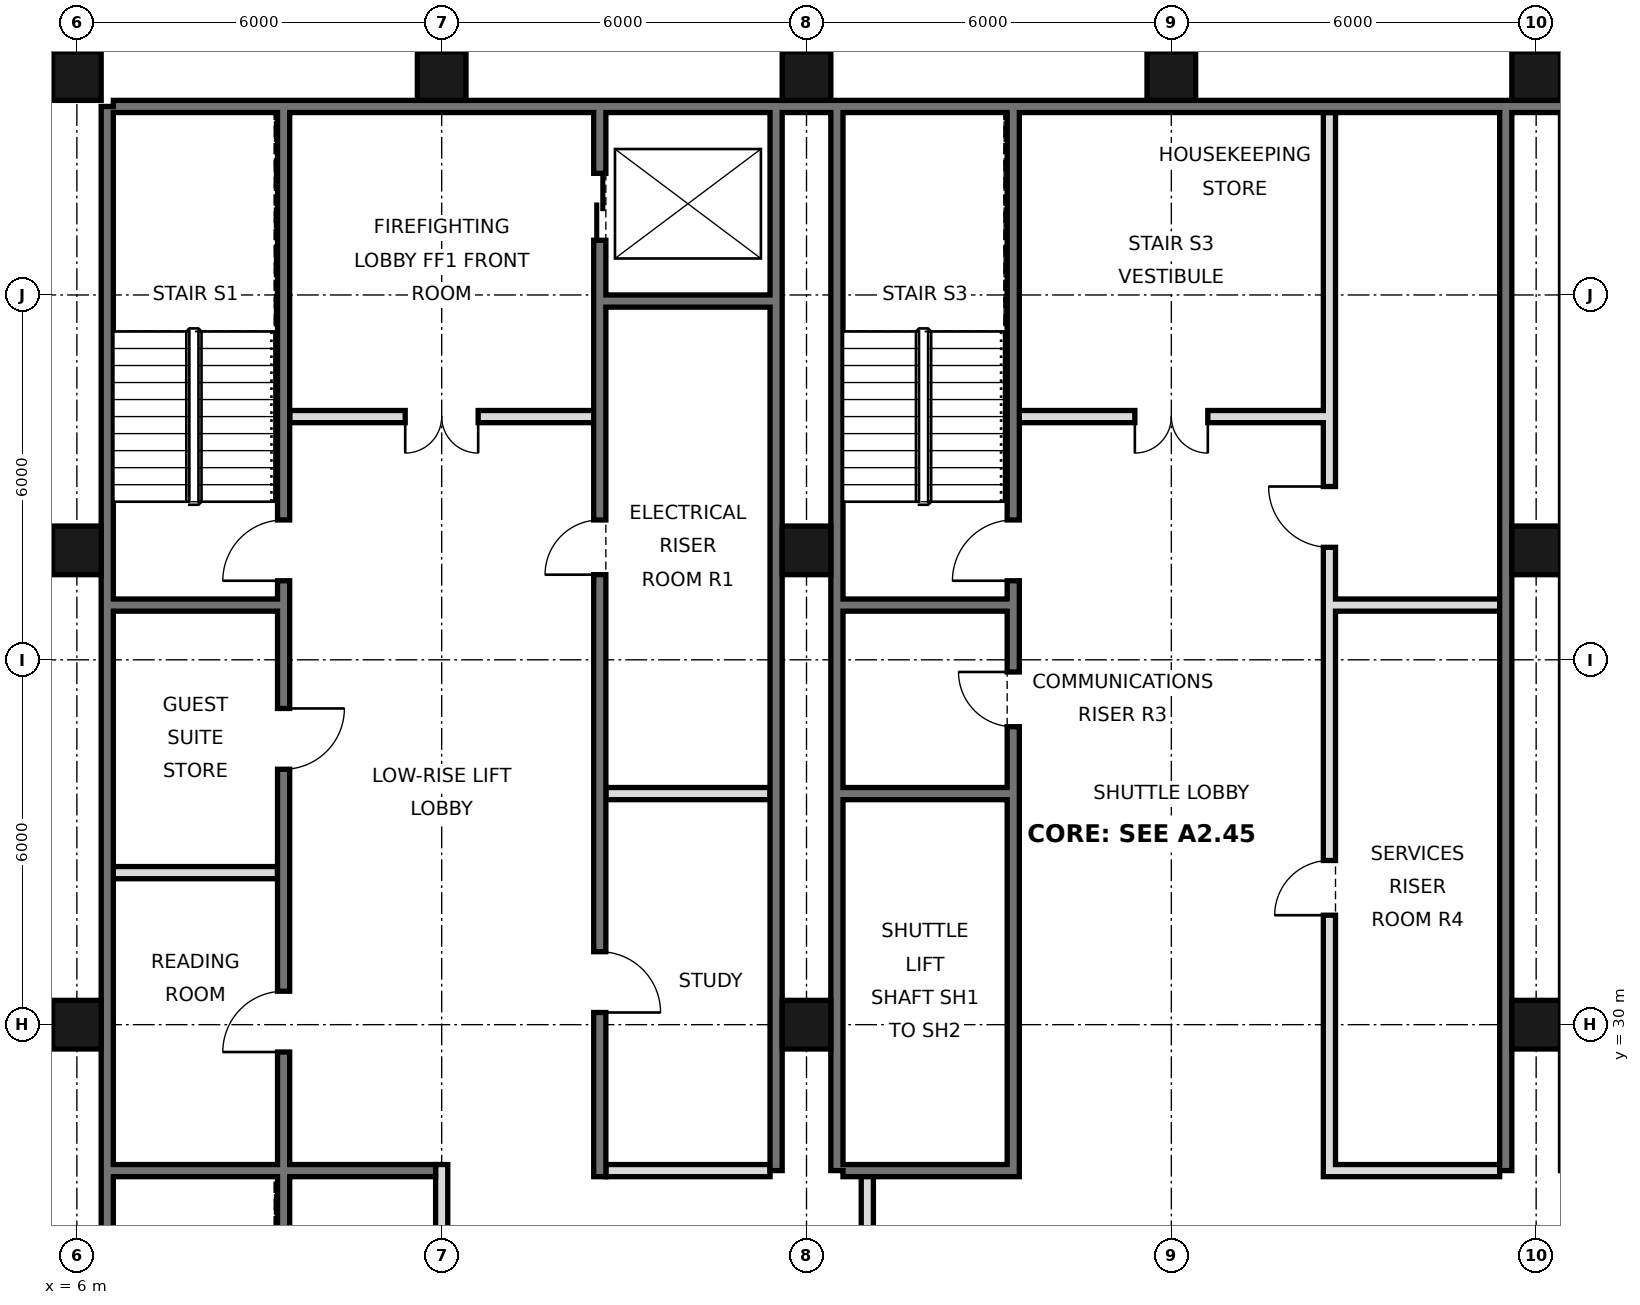
"""IFC4 building model, lengths in metres.
Left out: names, types, materials, properties, quantities, classifications, styles, units other than length and angle.
Written with IfcOpenShell. Run it as: python <this file> out.ifc"""

import sys

from ifc_helpers import new_model, si_unit, direction, frame, frame_2d, origin, origin_2d, place, context, subcontext, project, spatial, rectangle, hollow_rectangle, extrude, element, fill, save


model = new_model("IFC4")
c1 = context("Model", 3, precision=1e-05, world=origin(), true_north=direction((0.0, 1.0)))
c2 = subcontext(c1, "Body", "Model", "MODEL_VIEW")
j1 = project(units=[si_unit("LENGTHUNIT", "METRE"), si_unit("PLANEANGLEUNIT", "RADIAN")], contexts=[c1])
p1 = place(None, origin())
s1 = spatial("IfcSite", under=j1, at=p1, CompositionType="ELEMENT")
p2 = place(p1, origin())
s2 = spatial("IfcBuilding", under=s1, at=p2, CompositionType="ELEMENT")
p3 = place(p2, frame((0.0, 0.0, 178.0)))
s3 = spatial("IfcBuildingStorey", under=s2, at=p3, CompositionType="ELEMENT", Elevation=178.0)
for number, where, z_axis, x_axis in (
    (1, (6.0, 30.0, 0.0), (0.0, 0.0, 1.0), (1.0, 0.0, 0.0)),
    (2, (6.0, 37.8, 0.0), (0.0, 0.0, 1.0), (1.0, 0.0, 0.0)),
    (3, (6.0, 45.6, 0.0), (0.0, 0.0, 1.0), (1.0, 0.0, 0.0)),
    (4, (12.0, 45.6, 0.0), (0.0, 0.0, 1.0), (1.0, 0.0, 0.0)),
    (5, (18.0, 30.0, 0.0), (0.0, 0.0, 1.0), (1.0, 0.0, 0.0)),
    (6, (18.0, 37.8, 0.0), (0.0, 0.0, 1.0), (1.0, 0.0, 0.0)),
    (7, (18.0, 45.6, 0.0), (0.0, 0.0, 1.0), (1.0, 0.0, 0.0)),
    (8, (24.0, 45.6, 0.0), (0.0, 0.0, 1.0), (1.0, 0.0, 0.0)),
    (9, (30.0, 30.0, 0.0), (0.0, 0.0, 1.0), (1.0, 0.0, 0.0)),
    (10, (30.0, 37.8, 0.0), (0.0, 0.0, 1.0), (1.0, 0.0, 0.0)),
    (11, (30.0, 45.6, 0.0), (0.0, 0.0, 1.0), (1.0, 0.0, 0.0)),
):
    element("IfcColumn", number, at=place(p3, frame(where, z_axis=z_axis, x_axis=x_axis)), inside=s3, PredefinedType="COLUMN", context=c2, shape_type="SweptSolid", body=[
        extrude(hollow_rectangle(XDim=0.8, YDim=0.8, WallThickness=0.045, at=origin_2d()), origin(), (0.0, 0.0, 1.0), 3.6),
    ])
p4 = place(p3, frame((6.5, 21.6, 0.0), z_axis=(0.0, 0.0, 1.0), x_axis=(0.0, 1.0, 0.0)))
e12 = element("IfcWall", 12, at=p4, inside=s3, PredefinedType="SOLIDWALL", context=c2, shape_type="SweptSolid", body=[
    extrude(rectangle(XDim=23.5, YDim=0.2, at=frame_2d((11.75, 0.0))), origin(), (0.0, 0.0, 1.0), 3.42),
])
p5 = place(p3, frame((6.6, 45.1, 0.0), z_axis=(0.0, 0.0, 1.0), x_axis=(1.0, 0.0, 0.0)))
e13 = element("IfcWall", 13, at=p5, inside=s3, PredefinedType="SOLIDWALL", context=c2, shape_type="SweptSolid", body=[
    extrude(rectangle(XDim=34.8, YDim=0.2, at=frame_2d((17.4, 0.0))), origin(), (0.0, 0.0, 1.0), 3.42),
])
for number, where, z_axis, x_axis in (
    (14, (17.5, 27.6, 0.0), (0.0, 0.0, 1.0), (0.0, 1.0, 0.0)),
    (15, (18.5, 27.6, 0.0), (0.0, 0.0, 1.0), (0.0, 1.0, 0.0)),
    (16, (29.5, 27.6, 0.0), (0.0, 0.0, 1.0), (0.0, 1.0, 0.0)),
):
    element("IfcWall", number, at=place(p3, frame(where, z_axis=z_axis, x_axis=x_axis)), inside=s3, PredefinedType="SOLIDWALL", context=c2, shape_type="SweptSolid", body=[
        extrude(rectangle(XDim=17.5, YDim=0.2, at=frame_2d((8.75, 0.0))), origin(), (0.0, 0.0, 1.0), 3.42),
    ])
p6 = place(p3, frame((19.0, 21.6, 0.0), z_axis=(0.0, 0.0, 1.0), x_axis=(0.0, 1.0, 0.0)))
e17 = element("IfcWall", 17, at=p6, inside=s3, PredefinedType="PARTITIONING", context=c2, shape_type="SweptSolid", body=[
    extrude(rectangle(XDim=6.0, YDim=0.2, at=frame_2d((3.0, 0.0))), origin(), (0.0, 0.0, 1.0), 3.42),
])
p7 = place(p6, frame((2.1, 0.0, 0.0)))
e18 = element("IfcOpeningElement", 18, at=p7, cuts=e17, PredefinedType="OPENING", context=c2, shape_type="SweptSolid", body=[
    extrude(rectangle(XDim=1.8, YDim=2.1, at=frame_2d((0.9, 1.05))), frame((0.0, 0.11, 0.0), z_axis=(0.0, -1.0, 0.0), x_axis=(1.0, 0.0, 0.0)), (0.0, 0.0, 1.0), 0.22),
])
p8 = place(p3, frame((12.0, 21.6, 0.0), z_axis=(0.0, 0.0, 1.0), x_axis=(0.0, 1.0, 0.0)))
e19 = element("IfcWall", 19, at=p8, inside=s3, PredefinedType="PARTITIONING", context=c2, shape_type="SweptSolid", body=[
    extrude(rectangle(XDim=6.1, YDim=0.2, at=frame_2d((3.05, 0.0))), origin(), (0.0, 0.0, 1.0), 3.42),
])
p9 = place(p3, frame((14.6, 27.5, 0.0), z_axis=(0.0, 0.0, 1.0), x_axis=(0.0, 1.0, 0.0)))
e20 = element("IfcWall", 20, at=p9, inside=s3, PredefinedType="SOLIDWALL", context=c2, shape_type="SweptSolid", body=[
    extrude(rectangle(XDim=17.5, YDim=0.2, at=frame_2d((8.75, 0.0))), origin(), (0.0, 0.0, 1.0), 3.42),
])
p10 = place(p9, frame((15.4, 0.0, 0.0)))
e21 = element("IfcOpeningElement", 21, at=p10, cuts=e20, PredefinedType="OPENING", context=c2, shape_type="SweptSolid", body=[
    extrude(rectangle(XDim=1.1, YDim=2.1, at=frame_2d((0.55, 1.05))), frame((0.0, 0.11, 0.0), z_axis=(0.0, -1.0, 0.0), x_axis=(1.0, 0.0, 0.0)), (0.0, 0.0, 1.0), 0.22),
])
p11 = place(p9, frame((2.7, 0.0, 0.0)))
e22 = element("IfcOpeningElement", 22, at=p11, cuts=e20, PredefinedType="OPENING", context=c2, shape_type="SweptSolid", body=[
    extrude(rectangle(XDim=1.0, YDim=2.1, at=frame_2d((0.5, 1.05))), frame((0.0, 0.11, 0.0), z_axis=(0.0, -1.0, 0.0), x_axis=(1.0, 0.0, 0.0)), (0.0, 0.0, 1.0), 0.22),
])
p12 = place(p9, frame((9.9, 0.0, 0.0)))
e23 = element("IfcOpeningElement", 23, at=p12, cuts=e20, PredefinedType="OPENING", context=c2, shape_type="SweptSolid", body=[
    extrude(rectangle(XDim=0.9, YDim=2.1, at=frame_2d((0.45, 1.05))), frame((0.0, 0.11, 0.0), z_axis=(0.0, -1.0, 0.0), x_axis=(1.0, 0.0, 0.0)), (0.0, 0.0, 1.0), 0.22),
])
p13 = place(p3, frame((21.4, 27.5, 0.0), z_axis=(0.0, 0.0, 1.0), x_axis=(0.0, 1.0, 0.0)))
e24 = element("IfcWall", 24, at=p13, inside=s3, PredefinedType="SOLIDWALL", context=c2, shape_type="SweptSolid", body=[
    extrude(rectangle(XDim=17.5, YDim=0.2, at=frame_2d((8.75, 0.0))), origin(), (0.0, 0.0, 1.0), 3.42),
])
p14 = place(p13, frame((9.8, 0.0, 0.0)))
e25 = element("IfcOpeningElement", 25, at=p14, cuts=e24, PredefinedType="OPENING", context=c2, shape_type="SweptSolid", body=[
    extrude(rectangle(XDim=1.0, YDim=2.1, at=frame_2d((0.5, 1.05))), frame((0.0, 0.11, 0.0), z_axis=(0.0, -1.0, 0.0), x_axis=(1.0, 0.0, 0.0)), (0.0, 0.0, 1.0), 0.22),
])
p15 = place(p13, frame((7.4, 0.0, 0.0)))
e26 = element("IfcOpeningElement", 26, at=p15, cuts=e24, PredefinedType="OPENING", context=c2, shape_type="SweptSolid", body=[
    extrude(rectangle(XDim=0.9, YDim=2.1, at=frame_2d((0.45, 1.05))), frame((0.0, 0.11, 0.0), z_axis=(0.0, -1.0, 0.0), x_axis=(1.0, 0.0, 0.0)), (0.0, 0.0, 1.0), 0.22),
])
p16 = place(p3, frame((26.6, 27.5, 0.0), z_axis=(0.0, 0.0, 1.0), x_axis=(0.0, 1.0, 0.0)))
e27 = element("IfcWall", 27, at=p16, inside=s3, PredefinedType="SOLIDWALL", context=c2, shape_type="SweptSolid", body=[
    extrude(rectangle(XDim=17.5, YDim=0.2, at=frame_2d((8.75, 0.0))), origin(), (0.0, 0.0, 1.0), 3.42),
])
p17 = place(p16, frame((4.3, 0.0, 0.0)))
e28 = element("IfcOpeningElement", 28, at=p17, cuts=e27, PredefinedType="OPENING", context=c2, shape_type="SweptSolid", body=[
    extrude(rectangle(XDim=0.9, YDim=2.1, at=frame_2d((0.45, 1.05))), frame((0.0, 0.11, 0.0), z_axis=(0.0, -1.0, 0.0), x_axis=(1.0, 0.0, 0.0)), (0.0, 0.0, 1.0), 0.22),
])
p18 = place(p16, frame((10.35, 0.0, 0.0)))
e29 = element("IfcOpeningElement", 29, at=p18, cuts=e27, PredefinedType="OPENING", context=c2, shape_type="SweptSolid", body=[
    extrude(rectangle(XDim=1.0, YDim=2.1, at=frame_2d((0.5, 1.05))), frame((0.0, 0.11, 0.0), z_axis=(0.0, -1.0, 0.0), x_axis=(1.0, 0.0, 0.0)), (0.0, 0.0, 1.0), 0.22),
])
p19 = place(p3, frame((9.4, 21.6, 0.0), z_axis=(0.0, 0.0, 1.0), x_axis=(0.0, 1.0, 0.0)))
e30 = element("IfcWall", 30, at=p19, inside=s3, PredefinedType="SOLIDWALL", context=c2, shape_type="SweptSolid", body=[
    extrude(rectangle(XDim=23.4, YDim=0.2, at=frame_2d((11.7, 0.0))), origin(), (0.0, 0.0, 1.0), 3.42),
])
p20 = place(p19, frame((7.95, 0.0, 0.0)))
e31 = element("IfcOpeningElement", 31, at=p20, cuts=e30, PredefinedType="OPENING", context=c2, shape_type="SweptSolid", body=[
    extrude(rectangle(XDim=1.0, YDim=2.1, at=frame_2d((0.5, 1.05))), frame((0.0, 0.11, 0.0), z_axis=(0.0, -1.0, 0.0), x_axis=(1.0, 0.0, 0.0)), (0.0, 0.0, 1.0), 0.22),
])
p21 = place(p19, frame((12.6, 0.0, 0.0)))
e32 = element("IfcOpeningElement", 32, at=p21, cuts=e30, PredefinedType="OPENING", context=c2, shape_type="SweptSolid", body=[
    extrude(rectangle(XDim=1.0, YDim=2.1, at=frame_2d((0.5, 1.05))), frame((0.0, 0.11, 0.0), z_axis=(0.0, -1.0, 0.0), x_axis=(1.0, 0.0, 0.0)), (0.0, 0.0, 1.0), 0.22),
])
p22 = place(p19, frame((15.7, 0.0, 0.0)))
e33 = element("IfcOpeningElement", 33, at=p22, cuts=e30, PredefinedType="OPENING", context=c2, shape_type="SweptSolid", body=[
    extrude(rectangle(XDim=1.0, YDim=2.1, at=frame_2d((0.5, 1.05))), frame((0.0, 0.11, 0.0), z_axis=(0.0, -1.0, 0.0), x_axis=(1.0, 0.0, 0.0)), (0.0, 0.0, 1.0), 0.22),
])
p23 = place(p19, frame((0.175, 0.0, 0.0)))
e34 = element("IfcOpeningElement", 34, at=p23, cuts=e30, PredefinedType="OPENING", context=c2, shape_type="SweptSolid", body=[
    extrude(rectangle(XDim=0.9, YDim=2.1, at=frame_2d((0.45, 1.05))), frame((0.0, 0.11, 0.0), z_axis=(0.0, -1.0, 0.0), x_axis=(1.0, 0.0, 0.0)), (0.0, 0.0, 1.0), 0.22),
])
p24 = place(p3, frame((14.7, 27.6, 0.0), z_axis=(0.0, 0.0, 1.0), x_axis=(1.0, 0.0, 0.0)))
e35 = element("IfcWall", 35, at=p24, inside=s3, PredefinedType="PARTITIONING", context=c2, shape_type="SweptSolid", body=[
    extrude(rectangle(XDim=2.7, YDim=0.2, at=frame_2d((1.35, 0.0))), origin(), (0.0, 0.0, 1.0), 3.42),
])
for number, where, z_axis, x_axis in (
    (36, (18.6, 27.6, 0.0), (0.0, 0.0, 1.0), (1.0, 0.0, 0.0)),
    (37, (26.7, 27.6, 0.0), (0.0, 0.0, 1.0), (1.0, 0.0, 0.0)),
):
    element("IfcWall", number, at=place(p3, frame(where, z_axis=z_axis, x_axis=x_axis)), inside=s3, PredefinedType="SOLIDWALL", context=c2, shape_type="SweptSolid", body=[
        extrude(rectangle(XDim=2.7, YDim=0.2, at=frame_2d((1.35, 0.0))), origin(), (0.0, 0.0, 1.0), 3.42),
    ])
p25 = place(p3, frame((6.6, 27.6, 0.0), z_axis=(0.0, 0.0, 1.0), x_axis=(1.0, 0.0, 0.0)))
e38 = element("IfcWall", 38, at=p25, inside=s3, PredefinedType="SOLIDWALL", context=c2, shape_type="SweptSolid", body=[
    extrude(rectangle(XDim=5.3, YDim=0.2, at=frame_2d((2.65, 0.0))), origin(), (0.0, 0.0, 1.0), 3.42),
])
p26 = place(p3, frame((6.6, 32.5, 0.0), z_axis=(0.0, 0.0, 1.0), x_axis=(1.0, 0.0, 0.0)))
e39 = element("IfcWall", 39, at=p26, inside=s3, PredefinedType="PARTITIONING", context=c2, shape_type="SweptSolid", body=[
    extrude(rectangle(XDim=2.7, YDim=0.2, at=frame_2d((1.35, 0.0))), origin(), (0.0, 0.0, 1.0), 3.42),
])
for number, where, z_axis, x_axis in (
    (40, (14.7, 33.8, 0.0), (0.0, 0.0, 1.0), (1.0, 0.0, 0.0)),
    (41, (18.6, 33.8, 0.0), (0.0, 0.0, 1.0), (1.0, 0.0, 0.0)),
    (42, (18.6, 36.9, 0.0), (0.0, 0.0, 1.0), (1.0, 0.0, 0.0)),
    (43, (26.7, 36.9, 0.0), (0.0, 0.0, 1.0), (1.0, 0.0, 0.0)),
    (44, (6.6, 36.9, 0.0), (0.0, 0.0, 1.0), (1.0, 0.0, 0.0)),
):
    element("IfcWall", number, at=place(p3, frame(where, z_axis=z_axis, x_axis=x_axis)), inside=s3, PredefinedType="SOLIDWALL", context=c2, shape_type="SweptSolid", body=[
        extrude(rectangle(XDim=2.7, YDim=0.2, at=frame_2d((1.35, 0.0))), origin(), (0.0, 0.0, 1.0), 3.42),
    ])
p27 = place(p3, frame((21.5, 40.0, 0.0), z_axis=(0.0, 0.0, 1.0), x_axis=(1.0, 0.0, 0.0)))
e45 = element("IfcWall", 45, at=p27, inside=s3, PredefinedType="PARTITIONING", context=c2, shape_type="SweptSolid", body=[
    extrude(rectangle(XDim=5.0, YDim=0.2, at=frame_2d((2.5, 0.0))), origin(), (0.0, 0.0, 1.0), 3.42),
])
p28 = place(p27, frame((1.9, 0.0, 0.0)))
e46 = element("IfcOpeningElement", 46, at=p28, cuts=e45, PredefinedType="OPENING", context=c2, shape_type="SweptSolid", body=[
    extrude(rectangle(XDim=1.2, YDim=2.1, at=frame_2d((0.6, 1.05))), frame((0.0, 0.11, 0.0), z_axis=(0.0, -1.0, 0.0), x_axis=(1.0, 0.0, 0.0)), (0.0, 0.0, 1.0), 0.22),
])
p29 = place(p3, frame((9.5, 40.0, 0.0), z_axis=(0.0, 0.0, 1.0), x_axis=(1.0, 0.0, 0.0)))
e47 = element("IfcWall", 47, at=p29, inside=s3, PredefinedType="PARTITIONING", context=c2, shape_type="SweptSolid", body=[
    extrude(rectangle(XDim=5.0, YDim=0.2, at=frame_2d((2.5, 0.0))), origin(), (0.0, 0.0, 1.0), 3.42),
])
p30 = place(p29, frame((1.9, 0.0, 0.0)))
e48 = element("IfcOpeningElement", 48, at=p30, cuts=e47, PredefinedType="OPENING", context=c2, shape_type="SweptSolid", body=[
    extrude(rectangle(XDim=1.2, YDim=2.1, at=frame_2d((0.6, 1.05))), frame((0.0, 0.11, 0.0), z_axis=(0.0, -1.0, 0.0), x_axis=(1.0, 0.0, 0.0)), (0.0, 0.0, 1.0), 0.22),
])
p31 = place(p3, frame((14.7, 41.9, 0.0), z_axis=(0.0, 0.0, 1.0), x_axis=(1.0, 0.0, 0.0)))
e49 = element("IfcWall", 49, at=p31, inside=s3, PredefinedType="SOLIDWALL", context=c2, shape_type="SweptSolid", body=[
    extrude(rectangle(XDim=2.7, YDim=0.2, at=frame_2d((1.35, 0.0))), origin(), (0.0, 0.0, 1.0), 3.42),
])
p32 = place(p30, frame((1.2, 0.0, 0.0), z_axis=(0.0, 0.0, 1.0), x_axis=(-1.0, 0.0, 0.0)))
e50 = element("IfcDoor", 50, at=p32, inside=s3, OperationType="DOUBLE_DOOR_SINGLE_SWING", PredefinedType="DOOR", context=c2, shape_type="SweptSolid", body=[
    extrude(rectangle(XDim=1.2, YDim=2.1, at=frame_2d((0.6, 1.05))), frame((0.0, 0.025, 0.0), z_axis=(0.0, -1.0, 0.0), x_axis=(1.0, 0.0, 0.0)), (0.0, 0.0, 1.0), 0.05),
])
fill(e48, e50)
p33 = place(p28, frame((1.2, 0.0, 0.0), z_axis=(0.0, 0.0, 1.0), x_axis=(-1.0, 0.0, 0.0)))
e51 = element("IfcDoor", 51, at=p33, inside=s3, OperationType="DOUBLE_DOOR_SINGLE_SWING", PredefinedType="DOOR", context=c2, shape_type="SweptSolid", body=[
    extrude(rectangle(XDim=1.2, YDim=2.1, at=frame_2d((0.6, 1.05))), frame((0.0, 0.025, 0.0), z_axis=(0.0, -1.0, 0.0), x_axis=(1.0, 0.0, 0.0)), (0.0, 0.0, 1.0), 0.05),
])
fill(e46, e51)
p34 = place(p10, origin())
e52 = element("IfcDoor", 52, at=p34, inside=s3, OperationType="DOUBLE_DOOR_SLIDING", PredefinedType="DOOR", context=c2, shape_type="SweptSolid", body=[
    extrude(rectangle(XDim=1.1, YDim=2.1, at=frame_2d((0.55, 1.05))), frame((0.0, 0.025, 0.0), z_axis=(0.0, -1.0, 0.0), x_axis=(1.0, 0.0, 0.0)), (0.0, 0.0, 1.0), 0.05),
])
fill(e21, e52)
p35 = place(p11, frame((1.0, 0.0, 0.0), z_axis=(0.0, 0.0, 1.0), x_axis=(-1.0, 0.0, 0.0)))
e53 = element("IfcDoor", 53, at=p35, inside=s3, OperationType="SINGLE_SWING_RIGHT", PredefinedType="DOOR", context=c2, shape_type="SweptSolid", body=[
    extrude(rectangle(XDim=1.0, YDim=2.1, at=frame_2d((0.5, 1.05))), frame((0.0, 0.025, 0.0), z_axis=(0.0, -1.0, 0.0), x_axis=(1.0, 0.0, 0.0)), (0.0, 0.0, 1.0), 0.05),
])
fill(e22, e53)
p36 = place(p20, origin())
e54 = element("IfcDoor", 54, at=p36, inside=s3, OperationType="SINGLE_SWING_LEFT", PredefinedType="DOOR", context=c2, shape_type="SweptSolid", body=[
    extrude(rectangle(XDim=1.0, YDim=2.1, at=frame_2d((0.5, 1.05))), frame((0.0, 0.025, 0.0), z_axis=(0.0, -1.0, 0.0), x_axis=(1.0, 0.0, 0.0)), (0.0, 0.0, 1.0), 0.05),
])
fill(e31, e54)
p37 = place(p21, origin())
e55 = element("IfcDoor", 55, at=p37, inside=s3, OperationType="SINGLE_SWING_RIGHT", PredefinedType="DOOR", context=c2, shape_type="SweptSolid", body=[
    extrude(rectangle(XDim=1.0, YDim=2.1, at=frame_2d((0.5, 1.05))), frame((0.0, 0.025, 0.0), z_axis=(0.0, -1.0, 0.0), x_axis=(1.0, 0.0, 0.0)), (0.0, 0.0, 1.0), 0.05),
])
fill(e32, e55)
p38 = place(p22, origin())
e56 = element("IfcDoor", 56, at=p38, inside=s3, OperationType="SINGLE_SWING_LEFT", PredefinedType="DOOR", context=c2, shape_type="SweptSolid", body=[
    extrude(rectangle(XDim=1.0, YDim=2.1, at=frame_2d((0.5, 1.05))), frame((0.0, 0.025, 0.0), z_axis=(0.0, -1.0, 0.0), x_axis=(1.0, 0.0, 0.0)), (0.0, 0.0, 1.0), 0.05),
])
fill(e33, e56)
p39 = place(p14, origin())
e57 = element("IfcDoor", 57, at=p39, inside=s3, OperationType="SINGLE_SWING_LEFT", PredefinedType="DOOR", context=c2, shape_type="SweptSolid", body=[
    extrude(rectangle(XDim=1.0, YDim=2.1, at=frame_2d((0.5, 1.05))), frame((0.0, 0.025, 0.0), z_axis=(0.0, -1.0, 0.0), x_axis=(1.0, 0.0, 0.0)), (0.0, 0.0, 1.0), 0.05),
])
fill(e25, e57)
p40 = place(p12, origin())
e58 = element("IfcDoor", 58, at=p40, inside=s3, OperationType="SINGLE_SWING_LEFT", PredefinedType="DOOR", context=c2, shape_type="SweptSolid", body=[
    extrude(rectangle(XDim=0.9, YDim=2.1, at=frame_2d((0.45, 1.05))), frame((0.0, 0.025, 0.0), z_axis=(0.0, -1.0, 0.0), x_axis=(1.0, 0.0, 0.0)), (0.0, 0.0, 1.0), 0.05),
])
fill(e23, e58)
p41 = place(p15, frame((0.9, 0.0, 0.0), z_axis=(0.0, 0.0, 1.0), x_axis=(-1.0, 0.0, 0.0)))
e59 = element("IfcDoor", 59, at=p41, inside=s3, OperationType="SINGLE_SWING_LEFT", PredefinedType="DOOR", context=c2, shape_type="SweptSolid", body=[
    extrude(rectangle(XDim=0.9, YDim=2.1, at=frame_2d((0.45, 1.05))), frame((0.0, 0.025, 0.0), z_axis=(0.0, -1.0, 0.0), x_axis=(1.0, 0.0, 0.0)), (0.0, 0.0, 1.0), 0.05),
])
fill(e26, e59)
p42 = place(p17, origin())
e60 = element("IfcDoor", 60, at=p42, inside=s3, OperationType="SINGLE_SWING_LEFT", PredefinedType="DOOR", context=c2, shape_type="SweptSolid", body=[
    extrude(rectangle(XDim=0.9, YDim=2.1, at=frame_2d((0.45, 1.05))), frame((0.0, 0.025, 0.0), z_axis=(0.0, -1.0, 0.0), x_axis=(1.0, 0.0, 0.0)), (0.0, 0.0, 1.0), 0.05),
])
fill(e28, e60)
p43 = place(p18, frame((1.0, 0.0, 0.0), z_axis=(0.0, 0.0, 1.0), x_axis=(-1.0, 0.0, 0.0)))
e61 = element("IfcDoor", 61, at=p43, inside=s3, OperationType="SINGLE_SWING_LEFT", PredefinedType="DOOR", context=c2, shape_type="SweptSolid", body=[
    extrude(rectangle(XDim=1.0, YDim=2.1, at=frame_2d((0.5, 1.05))), frame((0.0, 0.025, 0.0), z_axis=(0.0, -1.0, 0.0), x_axis=(1.0, 0.0, 0.0)), (0.0, 0.0, 1.0), 0.05),
])
fill(e29, e61)
save(model, sys.argv[1])
